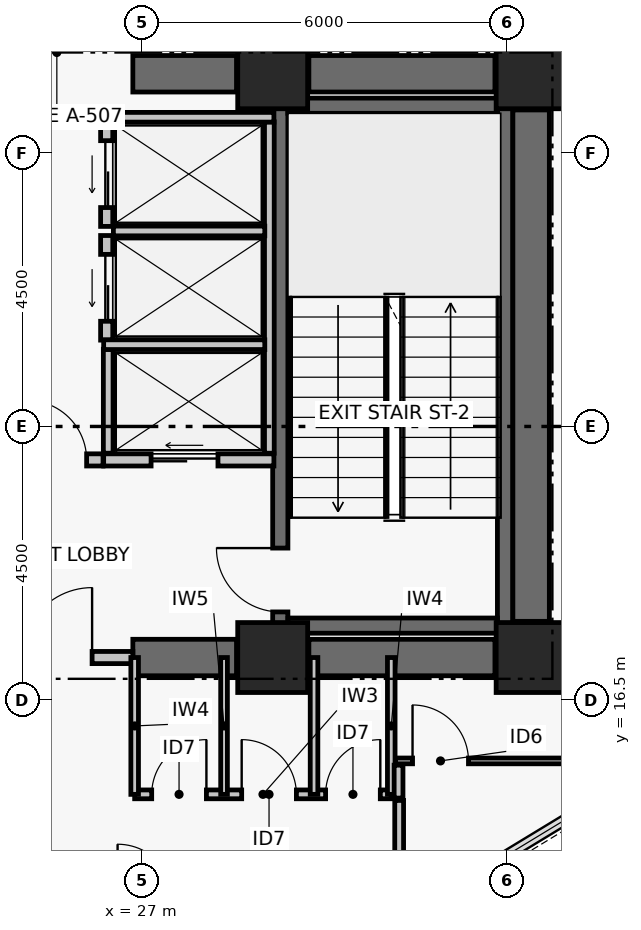
"""IFC4 building model, lengths in metres.
Left out: names, types, materials, properties, quantities, classifications, styles, units other than length and angle.
Written with IfcOpenShell. Run it as: python <this file> out.ifc"""

import sys

from ifc_helpers import new_model, si_unit, direction, frame, frame_2d, origin, origin_2d, place, context, subcontext, project, spatial, rectangle, extrude, element, fill, save


model = new_model("IFC4")
c1 = context("Model", 3, precision=1e-05, world=origin(), true_north=direction((0.0, 1.0)))
c2 = subcontext(c1, "Body", "Model", "MODEL_VIEW")
j1 = project(units=[si_unit("LENGTHUNIT", "METRE"), si_unit("PLANEANGLEUNIT", "RADIAN")], contexts=[c1])
p1 = place(None, origin())
s1 = spatial("IfcSite", under=j1, at=p1, CompositionType="ELEMENT")
p2 = place(p1, origin())
s2 = spatial("IfcBuilding", under=s1, at=p2, CompositionType="ELEMENT")
p3 = place(p2, frame((0.0, 0.0, 79.68)))
s3 = spatial("IfcBuildingStorey", under=s2, at=p3, CompositionType="ELEMENT", Elevation=79.68)
for number, where, z_axis, x_axis in (
    (1, (29.15, 17.2, 0.0), (0.0, 0.0, 1.0), (1.0, 0.0, 0.0)),
    (2, (33.4, 17.2, 0.0), (0.0, 0.0, 1.0), (1.0, 0.0, 0.0)),
    (3, (29.15, 26.8, 0.0), (0.0, 0.0, 1.0), (1.0, 0.0, 0.0)),
    (4, (33.4, 26.8, 0.0), (0.0, 0.0, 1.0), (1.0, 0.0, 0.0)),
):
    element("IfcColumn", number, at=place(p3, frame(where, z_axis=z_axis, x_axis=x_axis)), inside=s3, PredefinedType="COLUMN", context=c2, shape_type="SweptSolid", body=[
        extrude(rectangle(XDim=1.15, YDim=1.15, at=origin_2d()), origin(), (0.0, 0.0, 1.0), 3.72),
    ])
p4 = place(p3, frame((26.85, 17.2, 0.0), z_axis=(0.0, 0.0, 1.0), x_axis=(1.0, 0.0, 0.0)))
e5 = element("IfcWall", 5, at=p4, inside=s3, PredefinedType="SHEAR", context=c2, shape_type="SweptSolid", body=[
    extrude(rectangle(XDim=1.705, YDim=0.6, at=frame_2d((0.853, 0.0))), origin(), (0.0, 0.0, 1.0), 3.38),
])
p5 = place(p3, frame((29.745, 17.2, 0.0), z_axis=(0.0, 0.0, 1.0), x_axis=(1.0, 0.0, 0.0)))
e6 = element("IfcWall", 6, at=p5, inside=s3, PredefinedType="SHEAR", context=c2, shape_type="SweptSolid", body=[
    extrude(rectangle(XDim=3.06, YDim=0.6, at=frame_2d((1.53, 0.0))), origin(), (0.0, 0.0, 1.0), 3.38),
])
p6 = place(p3, frame((26.85, 26.8, 0.0), z_axis=(0.0, 0.0, 1.0), x_axis=(1.0, 0.0, 0.0)))
e7 = element("IfcWall", 7, at=p6, inside=s3, PredefinedType="SHEAR", context=c2, shape_type="SweptSolid", body=[
    extrude(rectangle(XDim=1.705, YDim=0.6, at=frame_2d((0.853, 0.0))), origin(), (0.0, 0.0, 1.0), 3.38),
])
p7 = place(p3, frame((29.745, 26.8, 0.0), z_axis=(0.0, 0.0, 1.0), x_axis=(1.0, 0.0, 0.0)))
e8 = element("IfcWall", 8, at=p7, inside=s3, PredefinedType="SHEAR", context=c2, shape_type="SweptSolid", body=[
    extrude(rectangle(XDim=3.06, YDim=0.6, at=frame_2d((1.53, 0.0))), origin(), (0.0, 0.0, 1.0), 3.38),
])
p8 = place(p3, frame((33.4, 17.795, 0.0), z_axis=(0.0, 0.0, 1.0), x_axis=(0.0, 1.0, 0.0)))
e9 = element("IfcWall", 9, at=p8, inside=s3, PredefinedType="SHEAR", context=c2, shape_type="SweptSolid", body=[
    extrude(rectangle(XDim=8.41, YDim=0.6, at=frame_2d((4.205, 0.0))), origin(), (0.0, 0.0, 1.0), 3.38),
])
p9 = place(p3, frame((29.275, 17.6, 0.0), z_axis=(0.0, 0.0, 1.0), x_axis=(0.0, 1.0, 0.0)))
e10 = element("IfcWall", 10, at=p9, inside=s3, PredefinedType="SHEAR", context=c2, shape_type="SweptSolid", body=[
    extrude(rectangle(XDim=8.8, YDim=0.25, at=frame_2d((4.4, 0.0))), origin(), (0.0, 0.0, 1.0), 3.38),
])
p10 = place(p9, frame((0.35, 0.0, 0.0)))
e11 = element("IfcOpeningElement", 11, at=p10, cuts=e10, PredefinedType="OPENING", context=c2, shape_type="SweptSolid", body=[
    extrude(rectangle(XDim=1.05, YDim=2.08, at=frame_2d((0.525, 1.04))), frame((0.0, 0.135, 0.0), z_axis=(0.0, -1.0, 0.0), x_axis=(1.0, 0.0, 0.0)), (0.0, 0.0, 1.0), 0.27),
])
p11 = place(p3, frame((32.971, 17.6, 0.0), z_axis=(0.0, 0.0, 1.0), x_axis=(0.0, 1.0, 0.0)))
e12 = element("IfcWall", 12, at=p11, inside=s3, PredefinedType="SHEAR", context=c2, shape_type="SweptSolid", body=[
    extrude(rectangle(XDim=8.8, YDim=0.25, at=frame_2d((4.4, 0.0))), origin(), (0.0, 0.0, 1.0), 3.38),
])
for number, where, z_axis, x_axis in (
    (13, (29.4, 17.725, 0.0), (0.0, 0.0, 1.0), (1.0, 0.0, 0.0)),
    (14, (29.4, 26.275, 0.0), (0.0, 0.0, 1.0), (1.0, 0.0, 0.0)),
):
    element("IfcWall", number, at=place(p3, frame(where, z_axis=z_axis, x_axis=x_axis)), inside=s3, PredefinedType="SHEAR", context=c2, shape_type="SweptSolid", body=[
        extrude(rectangle(XDim=3.446, YDim=0.25, at=frame_2d((1.723, 0.0))), origin(), (0.0, 0.0, 1.0), 3.38),
    ])
p12 = place(p3, frame((24.35, 17.2, 0.0), z_axis=(0.0, 0.0, 1.0), x_axis=(1.0, 0.0, 0.0)))
e15 = element("IfcWall", 15, at=p12, inside=s3, PredefinedType="PARTITIONING", context=c2, shape_type="SweptSolid", body=[
    extrude(rectangle(XDim=2.5, YDim=0.2, at=frame_2d((1.25, 0.0))), origin(), (0.0, 0.0, 1.0), 2.51),
])
p13 = place(p12, frame((0.68, 0.0, 0.0)))
e16 = element("IfcOpeningElement", 16, at=p13, cuts=e15, PredefinedType="OPENING", context=c2, shape_type="SweptSolid", body=[
    extrude(rectangle(XDim=1.15, YDim=2.08, at=frame_2d((0.575, 1.04))), frame((0.0, 0.11, 0.0), z_axis=(0.0, -1.0, 0.0), x_axis=(1.0, 0.0, 0.0)), (0.0, 0.0, 1.0), 0.22),
])
p14 = place(p3, frame((24.84, 20.45, 0.0), z_axis=(0.0, 0.0, 1.0), x_axis=(1.0, 0.0, 0.0)))
e17 = element("IfcWall", 17, at=p14, inside=s3, PredefinedType="PARTITIONING", context=c2, shape_type="SweptSolid", body=[
    extrude(rectangle(XDim=1.52, YDim=0.2, at=frame_2d((0.76, 0.0))), origin(), (0.0, 0.0, 1.0), 3.38),
])
p15 = place(p14, frame((0.27, 0.0, 0.0)))
e18 = element("IfcOpeningElement", 18, at=p15, cuts=e17, PredefinedType="OPENING", context=c2, shape_type="SweptSolid", body=[
    extrude(rectangle(XDim=0.98, YDim=2.06, at=frame_2d((0.49, 1.03))), frame((0.0, 0.11, 0.0), z_axis=(0.0, -1.0, 0.0), x_axis=(1.0, 0.0, 0.0)), (0.0, 0.0, 1.0), 0.22),
])
p16 = place(p3, frame((26.37, 20.45, 0.0), z_axis=(0.0, 0.0, 1.0), x_axis=(1.0, 0.0, 0.0)))
e19 = element("IfcWall", 19, at=p16, inside=s3, PredefinedType="PARTITIONING", context=c2, shape_type="SweptSolid", body=[
    extrude(rectangle(XDim=2.8, YDim=0.2, at=frame_2d((1.4, 0.0))), origin(), (0.0, 0.0, 1.0), 3.38),
])
p17 = place(p16, frame((0.78, 0.0, 0.0)))
e20 = element("IfcOpeningElement", 20, at=p17, cuts=e19, PredefinedType="OPENING", context=c2, shape_type="SweptSolid", body=[
    extrude(rectangle(XDim=1.1, YDim=2.08, at=frame_2d((0.55, 1.04))), frame((0.0, 0.11, 0.0), z_axis=(0.0, -1.0, 0.0), x_axis=(1.0, 0.0, 0.0)), (0.0, 0.0, 1.0), 0.22),
])
p18 = place(p3, frame((26.42, 22.42, 0.0), z_axis=(0.0, 0.0, 1.0), x_axis=(0.0, 1.0, 0.0)))
e21 = element("IfcWall", 21, at=p18, inside=s3, PredefinedType="PARTITIONING", context=c2, shape_type="SweptSolid", body=[
    extrude(rectangle(XDim=1.72, YDim=0.2, at=frame_2d((0.86, 0.0))), origin(), (0.0, 0.0, 1.0), 3.38),
])
p19 = place(p18, frame((0.31, 0.0, 0.0)))
e22 = element("IfcOpeningElement", 22, at=p19, cuts=e21, PredefinedType="OPENING", context=c2, shape_type="SweptSolid", body=[
    extrude(rectangle(XDim=1.1, YDim=2.08, at=frame_2d((0.55, 1.04))), frame((0.0, 0.11, 0.0), z_axis=(0.0, -1.0, 0.0), x_axis=(1.0, 0.0, 0.0)), (0.0, 0.0, 1.0), 0.22),
])
p20 = place(p3, frame((26.42, 24.29, 0.0), z_axis=(0.0, 0.0, 1.0), x_axis=(0.0, 1.0, 0.0)))
e23 = element("IfcWall", 23, at=p20, inside=s3, PredefinedType="PARTITIONING", context=c2, shape_type="SweptSolid", body=[
    extrude(rectangle(XDim=1.72, YDim=0.2, at=frame_2d((0.86, 0.0))), origin(), (0.0, 0.0, 1.0), 3.38),
])
p21 = place(p20, frame((0.31, 0.0, 0.0)))
e24 = element("IfcOpeningElement", 24, at=p21, cuts=e23, PredefinedType="OPENING", context=c2, shape_type="SweptSolid", body=[
    extrude(rectangle(XDim=1.1, YDim=2.08, at=frame_2d((0.55, 1.04))), frame((0.0, 0.11, 0.0), z_axis=(0.0, -1.0, 0.0), x_axis=(1.0, 0.0, 0.0)), (0.0, 0.0, 1.0), 0.22),
])
p22 = place(p3, frame((29.095, 20.56, 0.0), z_axis=(0.0, 0.0, 1.0), x_axis=(0.0, 1.0, 0.0)))
e25 = element("IfcWall", 25, at=p22, inside=s3, PredefinedType="PARTITIONING", context=c2, shape_type="SweptSolid", body=[
    extrude(rectangle(XDim=5.45, YDim=0.16, at=frame_2d((2.725, 0.0))), origin(), (0.0, 0.0, 1.0), 3.38),
])
p23 = place(p3, frame((26.445, 20.56, 0.0), z_axis=(0.0, 0.0, 1.0), x_axis=(0.0, 1.0, 0.0)))
e26 = element("IfcWall", 26, at=p23, inside=s3, PredefinedType="PARTITIONING", context=c2, shape_type="SweptSolid", body=[
    extrude(rectangle(XDim=1.71, YDim=0.16, at=frame_2d((0.855, 0.0))), origin(), (0.0, 0.0, 1.0), 3.38),
])
p24 = place(p3, frame((26.37, 22.345, 0.0), z_axis=(0.0, 0.0, 1.0), x_axis=(1.0, 0.0, 0.0)))
e27 = element("IfcWall", 27, at=p24, inside=s3, PredefinedType="PARTITIONING", context=c2, shape_type="SweptSolid", body=[
    extrude(rectangle(XDim=2.65, YDim=0.16, at=frame_2d((1.325, 0.0))), origin(), (0.0, 0.0, 1.0), 3.38),
])
p25 = place(p3, frame((26.53, 24.215, 0.0), z_axis=(0.0, 0.0, 1.0), x_axis=(1.0, 0.0, 0.0)))
e28 = element("IfcWall", 28, at=p25, inside=s3, PredefinedType="PARTITIONING", context=c2, shape_type="SweptSolid", body=[
    extrude(rectangle(XDim=2.49, YDim=0.16, at=frame_2d((1.245, 0.0))), origin(), (0.0, 0.0, 1.0), 3.38),
])
p26 = place(p3, frame((26.34, 26.085, 0.0), z_axis=(0.0, 0.0, 1.0), x_axis=(1.0, 0.0, 0.0)))
e29 = element("IfcWall", 29, at=p26, inside=s3, PredefinedType="PARTITIONING", context=c2, shape_type="SweptSolid", body=[
    extrude(rectangle(XDim=2.83, YDim=0.16, at=frame_2d((1.415, 0.0))), origin(), (0.0, 0.0, 1.0), 3.38),
])
p27 = place(p3, frame((26.88, 14.95, 0.0), z_axis=(0.0, 0.0, 1.0), x_axis=(1.0, 0.0, 0.0)))
e30 = element("IfcWall", 30, at=p27, inside=s3, PredefinedType="PARTITIONING", context=c2, shape_type="SweptSolid", body=[
    extrude(rectangle(XDim=4.22, YDim=0.145, at=frame_2d((2.11, 0.0))), origin(), (0.0, 0.0, 1.0), 2.91),
])
p28 = place(p27, frame((0.28, 0.0, 0.0)))
e31 = element("IfcOpeningElement", 31, at=p28, cuts=e30, PredefinedType="OPENING", context=c2, shape_type="SweptSolid", body=[
    extrude(rectangle(XDim=0.9, YDim=2.02, at=frame_2d((0.45, 1.01))), frame((0.0, 0.083, 0.0), z_axis=(0.0, -1.0, 0.0), x_axis=(1.0, 0.0, 0.0)), (0.0, 0.0, 1.0), 0.165),
])
p29 = place(p27, frame((1.76, 0.0, 0.0)))
e32 = element("IfcOpeningElement", 32, at=p29, cuts=e30, PredefinedType="OPENING", context=c2, shape_type="SweptSolid", body=[
    extrude(rectangle(XDim=0.9, YDim=2.02, at=frame_2d((0.45, 1.01))), frame((0.0, 0.083, 0.0), z_axis=(0.0, -1.0, 0.0), x_axis=(1.0, 0.0, 0.0)), (0.0, 0.0, 1.0), 0.165),
])
p30 = place(p27, frame((3.14, 0.0, 0.0)))
e33 = element("IfcOpeningElement", 33, at=p30, cuts=e30, PredefinedType="OPENING", context=c2, shape_type="SweptSolid", body=[
    extrude(rectangle(XDim=0.9, YDim=2.02, at=frame_2d((0.45, 1.01))), frame((0.0, 0.083, 0.0), z_axis=(0.0, -1.0, 0.0), x_axis=(1.0, 0.0, 0.0)), (0.0, 0.0, 1.0), 0.165),
])
p31 = place(p3, frame((26.88, 14.95, 0.0), z_axis=(0.0, 0.0, 1.0), x_axis=(0.0, 1.0, 0.0)))
e34 = element("IfcWall", 34, at=p31, inside=s3, PredefinedType="PARTITIONING", context=c2, shape_type="SweptSolid", body=[
    extrude(rectangle(XDim=2.25, YDim=0.125, at=frame_2d((1.125, 0.0))), origin(), (0.0, 0.0, 1.0), 2.51),
])
p32 = place(p3, frame((28.35, 14.95, 0.0), z_axis=(0.0, 0.0, 1.0), x_axis=(0.0, 1.0, 0.0)))
e35 = element("IfcWall", 35, at=p32, inside=s3, PredefinedType="PARTITIONING", context=c2, shape_type="SweptSolid", body=[
    extrude(rectangle(XDim=2.25, YDim=0.11, at=frame_2d((1.125, 0.0))), origin(), (0.0, 0.0, 1.0), 2.51),
])
for number, where, z_axis, x_axis in (
    (36, (29.83, 14.95, 0.0), (0.0, 0.0, 1.0), (0.0, 1.0, 0.0)),
    (37, (31.1, 14.95, 0.0), (0.0, 0.0, 1.0), (0.0, 1.0, 0.0)),
):
    element("IfcWall", number, at=place(p3, frame(where, z_axis=z_axis, x_axis=x_axis)), inside=s3, PredefinedType="PARTITIONING", context=c2, shape_type="SweptSolid", body=[
        extrude(rectangle(XDim=2.25, YDim=0.125, at=frame_2d((1.125, 0.0))), origin(), (0.0, 0.0, 1.0), 2.51),
    ])
p33 = place(p3, frame((31.23, 13.351, 0.0), z_axis=(0.0, 0.0, 1.0), x_axis=(0.0, 1.0, 0.0)))
e38 = element("IfcWall", 38, at=p33, inside=s3, PredefinedType="PARTITIONING", context=c2, shape_type="SweptSolid", body=[
    extrude(rectangle(XDim=1.499, YDim=0.145, at=frame_2d((0.75, 0.0))), origin(), (0.0, 0.0, 1.0), 2.76),
])
p34 = place(p3, frame((31.22, 14.889, 0.0), z_axis=(0.0, 0.0, 1.0), x_axis=(0.0, 1.0, 0.0)))
e39 = element("IfcWall", 39, at=p34, inside=s3, PredefinedType="PARTITIONING", context=c2, shape_type="SweptSolid", body=[
    extrude(rectangle(XDim=0.541, YDim=0.145, at=frame_2d((0.271, 0.0))), origin(), (0.0, 0.0, 1.0), 2.91),
])
p35 = place(p3, frame((33.74, 27.22, 0.0), z_axis=(0.0, 0.0, 1.0), x_axis=(-1.0, 0.0, 0.0)))
e40 = element("IfcWall", 40, at=p35, inside=s3, PredefinedType="PARTITIONING", context=c2, shape_type="SweptSolid", body=[
    extrude(rectangle(XDim=0.86, YDim=0.145, at=frame_2d((0.43, 0.0))), origin(), (0.0, 0.0, 1.0), 2.51),
])
p36 = place(p3, frame((31.17, 15.5, 0.0), z_axis=(0.0, 0.0, 1.0), x_axis=(1.0, 0.0, 0.0)))
e41 = element("IfcWall", 41, at=p36, inside=s3, PredefinedType="PARTITIONING", context=c2, shape_type="SweptSolid", body=[
    extrude(rectangle(XDim=4.354, YDim=0.095, at=frame_2d((2.177, 0.0))), origin(), (0.0, 0.0, 1.0), 2.76),
])
p37 = place(p36, frame((0.28, 0.0, 0.0)))
e42 = element("IfcOpeningElement", 42, at=p37, cuts=e41, PredefinedType="OPENING", context=c2, shape_type="SweptSolid", body=[
    extrude(rectangle(XDim=0.92, YDim=2.05, at=frame_2d((0.46, 1.025))), frame((0.0, 0.057, 0.0), z_axis=(0.0, -1.0, 0.0), x_axis=(1.0, 0.0, 0.0)), (0.0, 0.0, 1.0), 0.115),
])
p38 = place(p10, origin())
e43 = element("IfcDoor", 43, at=p38, inside=s3, OperationType="SINGLE_SWING_RIGHT", PredefinedType="DOOR", context=c2, shape_type="SweptSolid", body=[
    extrude(rectangle(XDim=1.05, YDim=2.08, at=frame_2d((0.525, 1.04))), frame((0.0, 0.025, 0.0), z_axis=(0.0, -1.0, 0.0), x_axis=(1.0, 0.0, 0.0)), (0.0, 0.0, 1.0), 0.05),
])
fill(e11, e43)
p39 = place(p13, origin())
e44 = element("IfcDoor", 44, at=p39, inside=s3, OperationType="SINGLE_SWING_RIGHT", PredefinedType="DOOR", context=c2, shape_type="SweptSolid", body=[
    extrude(rectangle(XDim=1.15, YDim=2.08, at=frame_2d((0.575, 1.04))), frame((0.0, 0.025, 0.0), z_axis=(0.0, -1.0, 0.0), x_axis=(1.0, 0.0, 0.0)), (0.0, 0.0, 1.0), 0.05),
])
fill(e16, e44)
p40 = place(p15, origin())
e45 = element("IfcDoor", 45, at=p40, inside=s3, OperationType="SINGLE_SWING_LEFT", PredefinedType="DOOR", context=c2, shape_type="SweptSolid", body=[
    extrude(rectangle(XDim=0.98, YDim=2.06, at=frame_2d((0.49, 1.03))), frame((0.0, 0.025, 0.0), z_axis=(0.0, -1.0, 0.0), x_axis=(1.0, 0.0, 0.0)), (0.0, 0.0, 1.0), 0.05),
])
fill(e18, e45)
p41 = place(p17, origin())
e46 = element("IfcDoor", 46, at=p41, inside=s3, OperationType="DOUBLE_DOOR_SLIDING", PredefinedType="DOOR", context=c2, shape_type="SweptSolid", body=[
    extrude(rectangle(XDim=1.1, YDim=2.08, at=frame_2d((0.55, 1.04))), frame((0.0, 0.025, 0.0), z_axis=(0.0, -1.0, 0.0), x_axis=(1.0, 0.0, 0.0)), (0.0, 0.0, 1.0), 0.05),
])
fill(e20, e46)
p42 = place(p19, origin())
e47 = element("IfcDoor", 47, at=p42, inside=s3, OperationType="DOUBLE_DOOR_SLIDING", PredefinedType="DOOR", context=c2, shape_type="SweptSolid", body=[
    extrude(rectangle(XDim=1.1, YDim=2.08, at=frame_2d((0.55, 1.04))), frame((0.0, 0.025, 0.0), z_axis=(0.0, -1.0, 0.0), x_axis=(1.0, 0.0, 0.0)), (0.0, 0.0, 1.0), 0.05),
])
fill(e22, e47)
p43 = place(p21, origin())
e48 = element("IfcDoor", 48, at=p43, inside=s3, OperationType="DOUBLE_DOOR_SLIDING", PredefinedType="DOOR", context=c2, shape_type="SweptSolid", body=[
    extrude(rectangle(XDim=1.1, YDim=2.08, at=frame_2d((0.55, 1.04))), frame((0.0, 0.025, 0.0), z_axis=(0.0, -1.0, 0.0), x_axis=(1.0, 0.0, 0.0)), (0.0, 0.0, 1.0), 0.05),
])
fill(e24, e48)
p44 = place(p28, origin())
e49 = element("IfcDoor", 49, at=p44, inside=s3, OperationType="SINGLE_SWING_RIGHT", PredefinedType="DOOR", context=c2, shape_type="SweptSolid", body=[
    extrude(rectangle(XDim=0.9, YDim=2.02, at=frame_2d((0.45, 1.01))), frame((0.0, 0.025, 0.0), z_axis=(0.0, -1.0, 0.0), x_axis=(1.0, 0.0, 0.0)), (0.0, 0.0, 1.0), 0.05),
])
fill(e31, e49)
p45 = place(p29, origin())
e50 = element("IfcDoor", 50, at=p45, inside=s3, OperationType="SINGLE_SWING_LEFT", PredefinedType="DOOR", context=c2, shape_type="SweptSolid", body=[
    extrude(rectangle(XDim=0.9, YDim=2.02, at=frame_2d((0.45, 1.01))), frame((0.0, 0.025, 0.0), z_axis=(0.0, -1.0, 0.0), x_axis=(1.0, 0.0, 0.0)), (0.0, 0.0, 1.0), 0.05),
])
fill(e32, e50)
p46 = place(p30, origin())
e51 = element("IfcDoor", 51, at=p46, inside=s3, OperationType="SINGLE_SWING_RIGHT", PredefinedType="DOOR", context=c2, shape_type="SweptSolid", body=[
    extrude(rectangle(XDim=0.9, YDim=2.02, at=frame_2d((0.45, 1.01))), frame((0.0, 0.025, 0.0), z_axis=(0.0, -1.0, 0.0), x_axis=(1.0, 0.0, 0.0)), (0.0, 0.0, 1.0), 0.05),
])
fill(e33, e51)
p47 = place(p37, origin())
e52 = element("IfcDoor", 52, at=p47, inside=s3, OperationType="SINGLE_SWING_LEFT", PredefinedType="DOOR", context=c2, shape_type="SweptSolid", body=[
    extrude(rectangle(XDim=0.92, YDim=2.05, at=frame_2d((0.46, 1.025))), frame((0.0, 0.025, 0.0), z_axis=(0.0, -1.0, 0.0), x_axis=(1.0, 0.0, 0.0)), (0.0, 0.0, 1.0), 0.05),
])
fill(e42, e52)
save(model, sys.argv[1])
